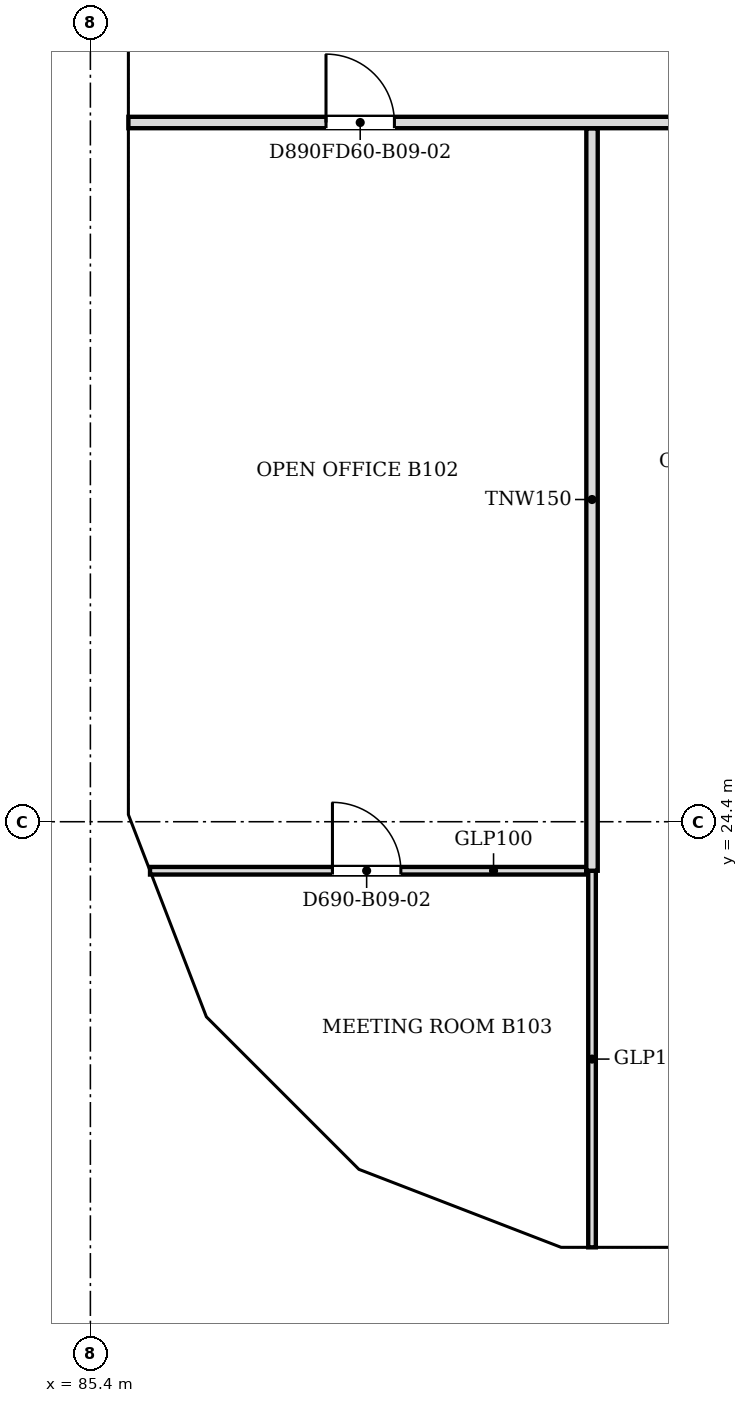
"""IFC4 building model, lengths in metres.
Left out: names, types, materials, properties, quantities, classifications, styles, units other than length and angle.
Written with IfcOpenShell. Run it as: python <this file> out.ifc"""

import sys

from ifc_helpers import new_model, si_unit, direction, frame, frame_2d, origin, place, context, subcontext, project, spatial, polyline, rectangle, outline, extrude, faceted_brep, source, transform, mapped, element, fill, save


model = new_model("IFC4")
c1 = context("Model", 3, precision=1e-05, world=origin(), true_north=direction((0.0, 1.0)))
c2 = subcontext(c1, "Body", "Model", "MODEL_VIEW")
j1 = project(units=[si_unit("LENGTHUNIT", "METRE"), si_unit("PLANEANGLEUNIT", "RADIAN")], contexts=[c1])
p1 = place(None, origin())
s1 = spatial("IfcSite", under=j1, at=p1, CompositionType="ELEMENT")
p2 = place(p1, origin())
s2 = spatial("IfcBuilding", under=s1, at=p2, CompositionType="ELEMENT")
p3 = place(p2, frame((0.0, 0.0, 91.4)))
s3 = spatial("IfcBuildingStorey", under=s2, at=p3, CompositionType="ELEMENT", Elevation=91.4)
m1 = source(origin(), c2, "Body", "Brep", [
    faceted_brep([(0.047, -0.25, 0.0), (3.05, -0.25, 3.8), (0.047, -0.25, 7.6), (0.0, -0.25, 7.54), (0.0, -0.25, 0.06), (0.093, 0.25, 7.541), (3.05, 0.25, 3.8), (0.093, 0.25, 0.059), (0.047, 0.0, 0.0), (0.047, 0.0, 7.6)], [[[0, 1, 2, 3, 4]], [[5, 6, 7]], [[7, 6, 1, 0, 8]], [[6, 5, 9, 2, 1]], [[3, 2, 9]], [[8, 0, 4]], [[7, 8, 4, 3, 9, 5]]]),
])
p4 = place(p3, frame((91.5, 18.55, -3.8), z_axis=(0.0, 0.0, 1.0), x_axis=(1.0, 0.0, 0.0)))
e1 = element("IfcWall", 1, at=p4, inside=s3, PredefinedType="SOLIDWALL", context=c2, shape_type="MappedRepresentation", body=[
    mapped(m1, transform((0.0, 0.0, 0.0), scale=1.0)),
])
m2 = source(origin(), c2, "Body", "SweptSolid", [
    extrude(outline(polyline([(0.247, 0.656), (2.731, 3.8), (0.247, 6.944), (0.247, 0.656)])), frame((0.0, 0.26, 0.0), z_axis=(0.0, -1.0, 0.0), x_axis=(1.0, 0.0, 0.0)), (0.0, 0.0, 1.0), 0.52),
])
p5 = place(p4, origin())
e2 = element("IfcOpeningElement", 2, at=p5, cuts=e1, PredefinedType="OPENING", context=c2, shape_type="MappedRepresentation", body=[
    mapped(m2, transform((0.0, 0.0, 0.0), scale=1.0)),
])
m3 = source(origin(), c2, "Body", "Brep", [
    faceted_brep([(2.95, -0.25, 0.0), (2.997, -0.25, 0.059), (2.997, -0.25, 7.541), (2.95, -0.25, 7.6), (0.0, -0.25, 3.8), (0.053, 0.25, 3.868), (2.904, 0.25, 7.54), (2.904, 0.25, 0.06), (0.053, 0.25, 3.732), (2.95, 0.0, 0.0), (2.95, 0.0, 7.6), (0.0, 0.0, 3.8)], [[[0, 1, 2, 3, 4]], [[5, 6, 7, 8]], [[1, 0, 9]], [[10, 3, 2]], [[6, 5, 11, 4, 3, 10]], [[8, 7, 9, 0, 4, 11]], [[8, 11, 5]], [[1, 9, 7, 6, 10, 2]]]),
])
p6 = place(p3, frame((88.794, 19.612, -3.8), z_axis=(0.0, 0.0, 1.0), x_axis=(0.933000876937, -0.359874094142, 0.0)))
e3 = element("IfcWall", 3, at=p6, inside=s3, PredefinedType="SOLIDWALL", context=c2, shape_type="MappedRepresentation", body=[
    mapped(m3, transform((0.0, 0.0, 0.0), scale=1.0)),
])
m4 = source(origin(), c2, "Body", "SweptSolid", [
    extrude(outline(polyline([(2.75, 6.935), (0.316, 3.8), (2.75, 0.665), (2.75, 6.935)])), frame((0.0, 0.26, 0.0), z_axis=(0.0, -1.0, 0.0), x_axis=(1.0, 0.0, 0.0)), (0.0, 0.0, 1.0), 0.52),
])
p7 = place(p6, origin())
e4 = element("IfcOpeningElement", 4, at=p7, cuts=e3, PredefinedType="OPENING", context=c2, shape_type="MappedRepresentation", body=[
    mapped(m4, transform((0.0, 0.0, 0.0), scale=1.0)),
])
m5 = source(origin(), c2, "Body", "SweptSolid", [
    extrude(outline(polyline([(3.05, 0.0), (6.1, 3.8), (3.05, 7.6), (0.0, 3.8), (3.05, 0.0)])), frame((0.0, 0.25, 0.0), z_axis=(0.0, -1.0, 0.0), x_axis=(1.0, 0.0, 0.0)), (0.0, 0.0, 1.0), 0.5),
])
p8 = place(p3, frame((85.65, 36.6, -3.8), z_axis=(0.0, 0.0, 1.0), x_axis=(0.0, -1.0, 0.0)))
e5 = element("IfcWall", 5, at=p8, inside=s3, PredefinedType="SOLIDWALL", context=c2, shape_type="MappedRepresentation", body=[
    mapped(m5, transform((0.0, 0.0, 0.0), scale=1.0)),
])
m6 = source(origin(), c2, "Body", "SweptSolid", [
    extrude(outline(polyline([(3.05, 0.399), (5.78, 3.8), (3.05, 7.2), (0.321, 3.8), (3.05, 0.399)])), frame((0.0, 0.26, 0.0), z_axis=(0.0, -1.0, 0.0), x_axis=(1.0, 0.0, 0.0)), (0.0, 0.0, 1.0), 0.52),
])
p9 = place(p8, origin())
e6 = element("IfcOpeningElement", 6, at=p9, cuts=e5, PredefinedType="OPENING", context=c2, shape_type="MappedRepresentation", body=[
    mapped(m6, transform((0.0, 0.0, 0.0), scale=1.0)),
])
m7 = source(origin(), c2, "Body", "Brep", [
    faceted_brep([(3.05, -0.25, 0.0), (6.053, -0.25, 3.8), (3.05, -0.25, 7.6), (0.0, -0.25, 3.8), (0.0, 0.25, 3.8), (3.05, 0.25, 7.6), (6.007, 0.25, 3.859), (6.007, 0.25, 3.741), (3.05, 0.25, 0.0), (6.053, 0.0, 3.8)], [[[0, 1, 2, 3]], [[4, 5, 6, 7, 8]], [[8, 7, 9, 1, 0]], [[6, 5, 2, 1, 9]], [[5, 4, 3, 2]], [[4, 8, 0, 3]], [[9, 7, 6]]]),
])
p10 = place(p3, frame((85.65, 30.5, -3.8), z_axis=(0.0, 0.0, 1.0), x_axis=(0.0, -1.0, 0.0)))
e7 = element("IfcWall", 7, at=p10, inside=s3, PredefinedType="SOLIDWALL", context=c2, shape_type="MappedRepresentation", body=[
    mapped(m7, transform((0.0, 0.0, 0.0), scale=1.0)),
])
m8 = source(origin(), c2, "Body", "SweptSolid", [
    extrude(outline(polyline([(3.049, 0.401), (5.735, 3.8), (3.049, 7.199), (0.321, 3.8), (3.049, 0.401)])), frame((0.0, 0.26, 0.0), z_axis=(0.0, -1.0, 0.0), x_axis=(1.0, 0.0, 0.0)), (0.0, 0.0, 1.0), 0.52),
])
p11 = place(p10, origin())
e8 = element("IfcOpeningElement", 8, at=p11, cuts=e7, PredefinedType="OPENING", context=c2, shape_type="MappedRepresentation", body=[
    mapped(m8, transform((0.0, 0.0, 0.0), scale=1.0)),
])
m9 = source(origin(), c2, "Body", "Brep", [
    faceted_brep([(2.95, -0.25, 0.0), (3.003, -0.25, 0.068), (3.003, -0.25, 7.531), (2.95, -0.25, 7.6), (0.0, -0.25, 3.8), (0.047, 0.25, 3.86), (2.898, 0.25, 7.532), (2.898, 0.25, 0.068), (0.047, 0.25, 3.74), (2.95, 0.0, 0.0), (2.95, 0.0, 7.6), (0.0, 0.0, 3.8)], [[[0, 1, 2, 3, 4]], [[5, 6, 7, 8]], [[1, 0, 9]], [[10, 3, 2]], [[6, 5, 11, 4, 3, 10]], [[8, 7, 9, 0, 4, 11]], [[8, 11, 5]], [[1, 9, 7, 6, 10, 2]]]),
])
p12 = place(p3, frame((85.65, 24.447, -3.8), z_axis=(0.0, 0.0, 1.0), x_axis=(0.35992665181, -0.932980602862, 0.0)))
e9 = element("IfcWall", 9, at=p12, inside=s3, PredefinedType="SOLIDWALL", context=c2, shape_type="MappedRepresentation", body=[
    mapped(m9, transform((0.0, 0.0, 0.0), scale=1.0)),
])
p13 = place(p12, origin())
e10 = element("IfcOpeningElement", 10, at=p13, cuts=e9, PredefinedType="OPENING", context=c2, shape_type="MappedRepresentation", body=[
    mapped(m4, transform((0.0, 0.0, 0.0), scale=1.0)),
])
m10 = source(origin(), c2, "Body", "Brep", [
    faceted_brep([(0.053, -0.25, 0.0), (2.997, -0.25, 3.8), (0.053, -0.25, 7.6), (0.0, -0.25, 7.532), (0.0, -0.25, 0.068), (0.106, 0.25, 7.531), (2.944, 0.25, 3.868), (2.944, 0.25, 3.732), (0.106, 0.25, 0.068), (2.997, 0.0, 3.8), (0.053, 0.0, 0.0), (0.053, 0.0, 7.6)], [[[0, 1, 2, 3, 4]], [[5, 6, 7, 8]], [[8, 7, 9, 1, 0, 10]], [[6, 5, 11, 2, 1, 9]], [[3, 2, 11]], [[10, 0, 4]], [[8, 10, 4, 3, 11, 5]], [[9, 7, 6]]]),
])
p14 = place(p3, frame((86.675, 21.731, -3.8), z_axis=(0.0, 0.0, 1.0), x_axis=(0.707106781187, -0.707106781187, 0.0)))
e11 = element("IfcWall", 11, at=p14, inside=s3, PredefinedType="SOLIDWALL", context=c2, shape_type="MappedRepresentation", body=[
    mapped(m10, transform((0.0, 0.0, 0.0), scale=1.0)),
])
m11 = source(origin(), c2, "Body", "SweptSolid", [
    extrude(outline(polyline([(0.253, 0.666), (2.681, 3.8), (0.253, 6.934), (0.253, 0.666)])), frame((0.0, 0.26, 0.0), z_axis=(0.0, -1.0, 0.0), x_axis=(1.0, 0.0, 0.0)), (0.0, 0.0, 1.0), 0.52),
])
p15 = place(p14, origin())
e12 = element("IfcOpeningElement", 12, at=p15, cuts=e11, PredefinedType="OPENING", context=c2, shape_type="MappedRepresentation", body=[
    mapped(m11, transform((0.0, 0.0, 0.0), scale=1.0)),
])
m12 = source(origin(), c2, "Body", "Brep", [
    faceted_brep([(3.003, -0.25, 0.0), (6.053, -0.25, 3.8), (0.0, -0.25, 3.8), (0.047, 0.25, 3.8), (6.053, 0.25, 3.8), (3.003, 0.25, 0.0), (0.047, 0.25, 3.741), (0.0, 0.0, 3.8)], [[[0, 1, 2]], [[3, 4, 5, 6]], [[5, 4, 1, 0]], [[4, 3, 7, 2, 1]], [[6, 5, 0, 2, 7]], [[6, 7, 3]]]),
])
p16 = place(p3, frame((91.547, 18.55, 0.0), z_axis=(0.0, 0.0, 1.0), x_axis=(1.0, 0.0, 0.0)))
e13 = element("IfcWall", 13, at=p16, inside=s3, PredefinedType="SOLIDWALL", context=c2, shape_type="MappedRepresentation", body=[
    mapped(m12, transform((0.0, 0.0, 0.0), scale=1.0)),
])
m13 = source(origin(), c2, "Body", "SweptSolid", [
    extrude(outline(polyline([(3.005, 0.401), (5.532, 3.55), (0.516, 3.55), (3.005, 0.401)])), frame((0.0, 0.26, 0.0), z_axis=(0.0, -1.0, 0.0), x_axis=(1.0, 0.0, 0.0)), (0.0, 0.0, 1.0), 0.52),
])
p17 = place(p16, origin())
e14 = element("IfcOpeningElement", 14, at=p17, cuts=e13, PredefinedType="OPENING", context=c2, shape_type="MappedRepresentation", body=[
    mapped(m13, transform((0.0, 0.0, 0.0), scale=1.0)),
])
m14 = source(origin(), c2, "Body", "Brep", [
    faceted_brep([(3.05, -0.25, 0.0), (6.1, -0.25, 3.8), (6.1, -0.25, 3.8), (0.0, -0.25, 3.8), (0.0, 0.25, 3.8), (6.1, 0.25, 3.8), (6.1, 0.25, 3.8), (3.05, 0.25, 0.0)], [[[0, 1, 2, 3]], [[4, 5, 6, 7]], [[7, 6, 1, 0]], [[5, 4, 3, 2]], [[4, 7, 0, 3]], [[1, 6, 5, 2]]]),
])
p18 = place(p3, frame((85.65, 39.65, 0.0), z_axis=(0.0, 0.0, 1.0), x_axis=(0.0, -1.0, 0.0)))
e15 = element("IfcWall", 15, at=p18, inside=s3, PredefinedType="SOLIDWALL", context=c2, shape_type="MappedRepresentation", body=[
    mapped(m14, transform((0.0, 0.0, 0.0), scale=1.0)),
])
m15 = source(origin(), c2, "Body", "SweptSolid", [
    extrude(outline(polyline([(3.05, 0.399), (5.579, 3.55), (0.521, 3.55), (3.05, 0.399)])), frame((0.0, 0.26, 0.0), z_axis=(0.0, -1.0, 0.0), x_axis=(1.0, 0.0, 0.0)), (0.0, 0.0, 1.0), 0.52),
])
p19 = place(p18, origin())
e16 = element("IfcOpeningElement", 16, at=p19, cuts=e15, PredefinedType="OPENING", context=c2, shape_type="MappedRepresentation", body=[
    mapped(m15, transform((0.0, 0.0, 0.0), scale=1.0)),
])
m16 = source(origin(), c2, "Body", "SweptSolid", [
    extrude(outline(polyline([(3.05, 0.0), (6.1, 3.8), (0.0, 3.8), (3.05, 0.0)])), frame((0.0, 0.25, 0.0), z_axis=(0.0, -1.0, 0.0), x_axis=(1.0, 0.0, 0.0)), (0.0, 0.0, 1.0), 0.5),
])
p20 = place(p3, frame((85.65, 33.55, 0.0), z_axis=(0.0, 0.0, 1.0), x_axis=(0.0, -1.0, 0.0)))
e17 = element("IfcWall", 17, at=p20, inside=s3, PredefinedType="SOLIDWALL", context=c2, shape_type="MappedRepresentation", body=[
    mapped(m16, transform((0.0, 0.0, 0.0), scale=1.0)),
])
p21 = place(p20, origin())
e18 = element("IfcOpeningElement", 18, at=p21, cuts=e17, PredefinedType="OPENING", context=c2, shape_type="MappedRepresentation", body=[
    mapped(m15, transform((0.0, 0.0, 0.0), scale=1.0)),
])
m17 = source(origin(), c2, "Body", "Brep", [
    faceted_brep([(3.003, -0.25, 0.0), (3.05, -0.25, 0.06), (3.05, -0.25, 3.8), (0.0, -0.25, 3.8), (0.0, 0.25, 3.8), (2.957, 0.25, 3.8), (2.957, 0.25, 0.059), (3.003, 0.0, 0.0)], [[[0, 1, 2, 3]], [[4, 5, 6]], [[1, 0, 7]], [[5, 4, 3, 2]], [[4, 6, 7, 0, 3]], [[1, 7, 6, 5, 2]]]),
])
p22 = place(p3, frame((85.65, 27.45, 0.0), z_axis=(0.0, 0.0, 1.0), x_axis=(0.0, -1.0, 0.0)))
e19 = element("IfcWall", 19, at=p22, inside=s3, PredefinedType="SOLIDWALL", context=c2, shape_type="MappedRepresentation", body=[
    mapped(m17, transform((0.0, 0.0, 0.0), scale=1.0)),
])
m18 = source(origin(), c2, "Body", "SweptSolid", [
    extrude(outline(polyline([(2.803, 3.55), (0.516, 3.55), (2.803, 0.656), (2.803, 3.55)])), frame((0.0, 0.26, 0.0), z_axis=(0.0, -1.0, 0.0), x_axis=(1.0, 0.0, 0.0)), (0.0, 0.0, 1.0), 0.52),
])
p23 = place(p22, origin())
e20 = element("IfcOpeningElement", 20, at=p23, cuts=e19, PredefinedType="OPENING", context=c2, shape_type="MappedRepresentation", body=[
    mapped(m18, transform((0.0, 0.0, 0.0), scale=1.0)),
])
m19 = source(origin(), c2, "Body", "Brep", [
    faceted_brep([(0.047, -0.25, 0.0), (2.997, -0.25, 3.8), (0.0, -0.25, 3.8), (0.0, -0.25, 0.059), (0.093, 0.25, 3.8), (2.944, 0.25, 3.8), (2.944, 0.25, 3.732), (0.093, 0.25, 0.06), (2.997, 0.0, 3.8), (0.047, 0.0, 0.0)], [[[0, 1, 2, 3]], [[4, 5, 6, 7]], [[7, 6, 8, 1, 0, 9]], [[5, 4, 2, 1, 8]], [[9, 0, 3]], [[7, 9, 3, 2, 4]], [[6, 5, 8]]]),
])
p24 = place(p3, frame((85.633, 24.49, 0.0), z_axis=(0.0, 0.0, 1.0), x_axis=(0.359901446078, -0.932990326376, 0.0)))
e21 = element("IfcWall", 21, at=p24, inside=s3, PredefinedType="SOLIDWALL", context=c2, shape_type="MappedRepresentation", body=[
    mapped(m19, transform((0.0, 0.0, 0.0), scale=1.0)),
])
m20 = source(origin(), c2, "Body", "SweptSolid", [
    extrude(outline(polyline([(0.247, 0.665), (2.487, 3.55), (0.247, 3.55), (0.247, 0.665)])), frame((0.0, 0.26, 0.0), z_axis=(0.0, -1.0, 0.0), x_axis=(1.0, 0.0, 0.0)), (0.0, 0.0, 1.0), 0.52),
])
p25 = place(p24, origin())
e22 = element("IfcOpeningElement", 22, at=p25, cuts=e21, PredefinedType="OPENING", context=c2, shape_type="MappedRepresentation", body=[
    mapped(m20, transform((0.0, 0.0, 0.0), scale=1.0)),
])
m21 = source(origin(), c2, "Body", "Brep", [
    faceted_brep([(2.944, -0.25, 0.0), (2.997, -0.25, 0.068), (2.997, -0.25, 3.8), (0.0, -0.25, 3.8), (0.053, 0.25, 3.8), (2.891, 0.25, 3.8), (2.891, 0.25, 0.068), (0.053, 0.25, 3.732), (2.944, 0.0, 0.0), (0.0, 0.0, 3.8)], [[[0, 1, 2, 3]], [[4, 5, 6, 7]], [[1, 0, 8]], [[5, 4, 9, 3, 2]], [[7, 6, 8, 0, 3, 9]], [[7, 9, 4]], [[1, 8, 6, 5, 2]]]),
])
p26 = place(p3, frame((86.712, 21.694, 0.0), z_axis=(0.0, 0.0, 1.0), x_axis=(0.707066050402, -0.707147509625, 0.0)))
e23 = element("IfcWall", 23, at=p26, inside=s3, PredefinedType="SOLIDWALL", context=c2, shape_type="MappedRepresentation", body=[
    mapped(m21, transform((0.0, 0.0, 0.0), scale=1.0)),
])
m22 = source(origin(), c2, "Body", "SweptSolid", [
    extrude(outline(polyline([(2.744, 3.55), (0.51, 3.55), (2.744, 0.667), (2.744, 3.55)])), frame((0.0, 0.26, 0.0), z_axis=(0.0, -1.0, 0.0), x_axis=(1.0, 0.0, 0.0)), (0.0, 0.0, 1.0), 0.52),
])
p27 = place(p26, origin())
e24 = element("IfcOpeningElement", 24, at=p27, cuts=e23, PredefinedType="OPENING", context=c2, shape_type="MappedRepresentation", body=[
    mapped(m22, transform((0.0, 0.0, 0.0), scale=1.0)),
])
m23 = source(origin(), c2, "Body", "Brep", [
    faceted_brep([(0.053, -0.25, 0.0), (3.003, -0.25, 3.8), (0.0, -0.25, 3.8), (0.0, -0.25, 0.068), (0.106, 0.25, 3.8), (2.957, 0.25, 3.8), (2.957, 0.25, 3.74), (0.106, 0.25, 0.068), (3.003, 0.0, 3.8), (0.053, 0.0, 0.0)], [[[0, 1, 2, 3]], [[4, 5, 6, 7]], [[7, 6, 8, 1, 0, 9]], [[5, 4, 2, 1, 8]], [[9, 0, 3]], [[7, 9, 3, 2, 4]], [[6, 5, 8]]]),
])
p28 = place(p3, frame((88.744, 19.631, 0.0), z_axis=(0.0, 0.0, 1.0), x_axis=(0.932997369089, -0.359883188373, 0.0)))
e25 = element("IfcWall", 25, at=p28, inside=s3, PredefinedType="SOLIDWALL", context=c2, shape_type="MappedRepresentation", body=[
    mapped(m23, transform((0.0, 0.0, 0.0), scale=1.0)),
])
m24 = source(origin(), c2, "Body", "SweptSolid", [
    extrude(outline(polyline([(0.253, 0.665), (2.493, 3.55), (0.253, 3.55), (0.253, 0.665)])), frame((0.0, 0.26, 0.0), z_axis=(0.0, -1.0, 0.0), x_axis=(1.0, 0.0, 0.0)), (0.0, 0.0, 1.0), 0.52),
])
p29 = place(p28, origin())
e26 = element("IfcOpeningElement", 26, at=p29, cuts=e25, PredefinedType="OPENING", context=c2, shape_type="MappedRepresentation", body=[
    mapped(m24, transform((0.0, 0.0, 0.0), scale=1.0)),
])
p30 = place(p3, frame((92.0, 18.8, 0.0), z_axis=(0.0, 0.0, 1.0), x_axis=(0.0, 1.0, 0.0)))
e27 = element("IfcWall", 27, at=p30, inside=s3, PredefinedType="PARTITIONING", context=c2, shape_type="SweptSolid", body=[
    extrude(rectangle(XDim=4.954, YDim=0.1, at=frame_2d((2.477, 0.0))), origin(), (0.0, 0.0, 1.0), 2.895),
])
p31 = place(p3, frame((91.924, 23.755, 0.0), z_axis=(0.0, 0.0, 1.0), x_axis=(-1.0, 0.0, 0.0)))
e28 = element("IfcWall", 28, at=p31, inside=s3, PredefinedType="PARTITIONING", context=c2, shape_type="SweptSolid", body=[
    extrude(rectangle(XDim=5.739, YDim=0.1, at=frame_2d((2.87, 0.0))), origin(), (0.0, 0.0, 1.0), 2.895),
])
m25 = source(origin(), c2, "Body", "SweptSolid", [
    extrude(rectangle(XDim=0.9, YDim=2.1, at=frame_2d((0.45, 1.05))), frame((0.0, 0.06, 0.0), z_axis=(0.0, -1.0, 0.0), x_axis=(1.0, 0.0, 0.0)), (0.0, 0.0, 1.0), 0.12),
])
p32 = place(p31, frame((2.439, 0.0, 0.0)))
e29 = element("IfcOpeningElement", 29, at=p32, cuts=e28, PredefinedType="OPENING", context=c2, shape_type="MappedRepresentation", body=[
    mapped(m25, transform((0.0, 0.0, 0.0), scale=1.0)),
])
p33 = place(p3, frame((92.0, 23.755, 0.0), z_axis=(0.0, 0.0, 1.0), x_axis=(0.0, 1.0, 0.0)))
e30 = element("IfcWall", 30, at=p33, inside=s3, PredefinedType="PARTITIONING", context=c2, shape_type="SweptSolid", body=[
    extrude(rectangle(XDim=9.769, YDim=0.15, at=frame_2d((4.885, 0.0))), origin(), (0.0, 0.0, 1.0), 2.895),
])
p34 = place(p3, frame((133.7, 33.6, 0.0), z_axis=(0.0, 0.0, 1.0), x_axis=(-1.0, 0.0, 0.0)))
e31 = element("IfcWall", 31, at=p34, inside=s3, PredefinedType="PARTITIONING", context=c2, shape_type="SweptSolid", body=[
    extrude(rectangle(XDim=47.8, YDim=0.15, at=frame_2d((23.9, 0.0))), origin(), (0.0, 0.0, 1.0), 2.895),
])
m26 = source(origin(), c2, "Body", "SweptSolid", [
    extrude(rectangle(XDim=0.9, YDim=2.1, at=frame_2d((0.45, 1.05))), frame((0.0, 0.085, 0.0), z_axis=(0.0, -1.0, 0.0), x_axis=(1.0, 0.0, 0.0)), (0.0, 0.0, 1.0), 0.17),
])
p35 = place(p34, frame((2.099, 0.0, 0.0)))
e32 = element("IfcOpeningElement", 32, at=p35, cuts=e31, PredefinedType="OPENING", context=c2, shape_type="MappedRepresentation", body=[
    mapped(m26, transform((0.0, 0.0, 0.0), scale=1.0)),
])
m27 = source(origin(), c2, "Body", "SweptSolid", [
    extrude(rectangle(XDim=1.0, YDim=2.1, at=frame_2d((0.5, 1.05))), frame((0.0, 0.085, 0.0), z_axis=(0.0, -1.0, 0.0), x_axis=(1.0, 0.0, 0.0)), (0.0, 0.0, 1.0), 0.17),
])
p36 = place(p34, frame((38.399, 0.0, 0.0)))
e33 = element("IfcOpeningElement", 33, at=p36, cuts=e31, PredefinedType="OPENING", context=c2, shape_type="MappedRepresentation", body=[
    mapped(m27, transform((0.0, 0.0, 0.0), scale=1.0)),
])
p37 = place(p34, frame((44.3, 0.0, 0.0)))
e34 = element("IfcOpeningElement", 34, at=p37, cuts=e31, PredefinedType="OPENING", context=c2, shape_type="MappedRepresentation", body=[
    mapped(m26, transform((0.0, 0.0, 0.0), scale=1.0)),
])
p38 = place(p34, frame((32.4, 0.0, 0.0)))
e35 = element("IfcOpeningElement", 35, at=p38, cuts=e31, PredefinedType="OPENING", context=c2, shape_type="MappedRepresentation", body=[
    mapped(m26, transform((0.0, 0.0, 0.0), scale=1.0)),
])
p39 = place(p34, frame((10.799, 0.0, 0.0)))
e36 = element("IfcOpeningElement", 36, at=p39, cuts=e31, PredefinedType="OPENING", context=c2, shape_type="MappedRepresentation", body=[
    mapped(m26, transform((0.0, 0.0, 0.0), scale=1.0)),
])
p40 = place(p34, frame((23.0, 0.0, 0.0)))
e37 = element("IfcOpeningElement", 37, at=p40, cuts=e31, PredefinedType="OPENING", context=c2, shape_type="MappedRepresentation", body=[
    mapped(m26, transform((0.0, 0.0, 0.0), scale=1.0)),
])
m28 = source(origin(), c2, "Body", "SweptSolid", [
    extrude(rectangle(XDim=0.9, YDim=2.1, at=frame_2d((0.45, 1.05))), frame((0.0, 0.025, 0.0), z_axis=(0.0, -1.0, 0.0), x_axis=(1.0, 0.0, 0.0)), (0.0, 0.0, 1.0), 0.05),
])
p41 = place(p32, origin())
e38 = element("IfcDoor", 38, at=p41, inside=s3, OperationType="SINGLE_SWING_RIGHT", PredefinedType="DOOR", context=c2, shape_type="MappedRepresentation", body=[
    mapped(m28, transform((0.0, 0.0, 0.0), scale=1.0)),
])
fill(e29, e38)
p42 = place(p37, origin())
e39 = element("IfcDoor", 39, at=p42, inside=s3, OperationType="SINGLE_SWING_RIGHT", PredefinedType="DOOR", context=c2, shape_type="MappedRepresentation", body=[
    mapped(m28, transform((0.0, 0.0, 0.0), scale=1.0)),
])
fill(e34, e39)
save(model, sys.argv[1])
